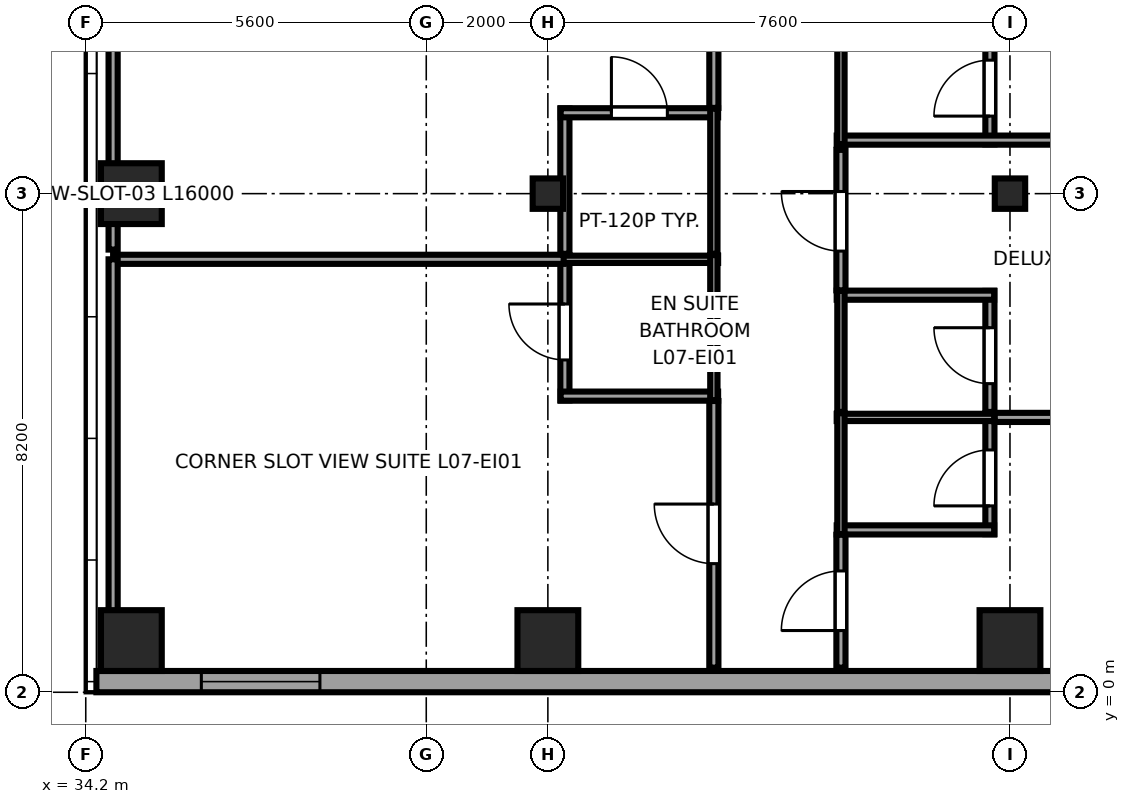
"""IFC4 building model, lengths in metres.
Left out: names, types, materials, properties, quantities, classifications, styles, units other than length and angle.
Written with IfcOpenShell. Run it as: python <this file> out.ifc"""

import sys

from ifc_helpers import new_model, si_unit, direction, frame, frame_2d, origin, origin_2d, place, context, subcontext, project, spatial, rectangle, i_section, extrude, source, transform, mapped, element, fill, save


model = new_model("IFC4")
c1 = context("Model", 3, precision=1e-05, world=origin(), true_north=direction((0.0, 1.0)))
c2 = subcontext(c1, "Body", "Model", "MODEL_VIEW")
j1 = project(units=[si_unit("LENGTHUNIT", "METRE"), si_unit("PLANEANGLEUNIT", "RADIAN")], contexts=[c1])
p1 = place(None, origin())
s1 = spatial("IfcSite", under=j1, at=p1, CompositionType="ELEMENT")
p2 = place(p1, origin())
s2 = spatial("IfcBuilding", under=s1, at=p2, CompositionType="ELEMENT")
p3 = place(p2, frame((0.0, 0.0, 35.55)))
s3 = spatial("IfcBuildingStorey", under=s2, at=p3, CompositionType="ELEMENT", Elevation=35.55)
m1 = source(origin(), c2, "Body", "SweptSolid", [
    extrude(rectangle(XDim=1.0, YDim=1.0, at=origin_2d()), origin(), (0.0, 0.0, 1.0), 3.55),
])
for number, where, z_axis, x_axis in (
    (1, (34.95, 0.85, 0.0), (0.0, 0.0, 1.0), (1.0, 0.0, 0.0)),
    (2, (34.95, 8.2, 0.0), (0.0, 0.0, 1.0), (1.0, 0.0, 0.0)),
    (3, (41.8, 0.85, 0.0), (0.0, 0.0, 1.0), (1.0, 0.0, 0.0)),
):
    element("IfcColumn", number, at=place(p3, frame(where, z_axis=z_axis, x_axis=x_axis)), inside=s3, PredefinedType="COLUMN", context=c2, shape_type="MappedRepresentation", body=[
        mapped(m1, transform((0.0, 0.0, 0.0), x_axis=(1.0, 0.0, 0.0), y_axis=(0.0, 1.0, 0.0), z_axis=(0.0, 0.0, 1.0), scale=1.0)),
    ])
m2 = source(origin(), c2, "Body", "SweptSolid", [
    extrude(i_section(OverallWidth=0.5, OverallDepth=0.5, WebThickness=0.028, FlangeThickness=0.045, at=origin_2d()), origin(), (0.0, 0.0, 1.0), 3.55),
])
p4 = place(p3, frame((41.8, 8.2, 0.0), z_axis=(0.0, 0.0, 1.0), x_axis=(1.0, 0.0, 0.0)))
e4 = element("IfcColumn", 4, at=p4, inside=s3, PredefinedType="COLUMN", context=c2, shape_type="MappedRepresentation", body=[
    mapped(m2, transform((0.0, 0.0, 0.0), x_axis=(1.0, 0.0, 0.0), y_axis=(0.0, 1.0, 0.0), z_axis=(0.0, 0.0, 1.0), scale=1.0)),
])
p5 = place(p3, frame((49.4, 0.85, 0.0), z_axis=(0.0, 0.0, 1.0), x_axis=(1.0, 0.0, 0.0)))
e5 = element("IfcColumn", 5, at=p5, inside=s3, PredefinedType="COLUMN", context=c2, shape_type="MappedRepresentation", body=[
    mapped(m1, transform((0.0, 0.0, 0.0), x_axis=(1.0, 0.0, 0.0), y_axis=(0.0, 1.0, 0.0), z_axis=(0.0, 0.0, 1.0), scale=1.0)),
])
p6 = place(p3, frame((49.4, 8.2, 0.0), z_axis=(0.0, 0.0, 1.0), x_axis=(1.0, 0.0, 0.0)))
e6 = element("IfcColumn", 6, at=p6, inside=s3, PredefinedType="COLUMN", context=c2, shape_type="MappedRepresentation", body=[
    mapped(m2, transform((0.0, 0.0, 0.0), x_axis=(1.0, 0.0, 0.0), y_axis=(0.0, 1.0, 0.0), z_axis=(0.0, 0.0, 1.0), scale=1.0)),
])
p7 = place(p3, frame((34.375, 0.175, 0.0), z_axis=(0.0, 0.0, 1.0), x_axis=(1.0, 0.0, 0.0)))
e7 = element("IfcWall", 7, at=p7, inside=s3, PredefinedType="SOLIDWALL", context=c2, shape_type="SweptSolid", body=[
    extrude(rectangle(XDim=18.008, YDim=0.35, at=frame_2d((9.004, 0.0))), origin(), (0.0, 0.0, 1.0), 3.37),
])
p8 = place(p7, frame((1.726, 0.0, 0.68)))
e8 = element("IfcOpeningElement", 8, at=p8, cuts=e7, PredefinedType="OPENING", context=c2, shape_type="SweptSolid", body=[
    extrude(rectangle(XDim=1.95, YDim=1.82, at=frame_2d((0.975, 0.91))), frame((0.0, 0.185, 0.0), z_axis=(0.0, -1.0, 0.0), x_axis=(1.0, 0.0, 0.0)), (0.0, 0.0, 1.0), 0.37),
])
p9 = place(p7, frame((15.725, 0.0, 0.62)))
e9 = element("IfcOpeningElement", 9, at=p9, cuts=e7, PredefinedType="OPENING", context=c2, shape_type="SweptSolid", body=[
    extrude(rectangle(XDim=1.5, YDim=1.55, at=frame_2d((0.75, 0.775))), frame((0.0, 0.185, 0.0), z_axis=(0.0, -1.0, 0.0), x_axis=(1.0, 0.0, 0.0)), (0.0, 0.0, 1.0), 0.37),
])
p10 = place(p3, frame((42.08, 4.8, 0.0), z_axis=(0.0, 0.0, 1.0), x_axis=(0.0, 1.0, 0.0)))
e10 = element("IfcWall", 10, at=p10, inside=s3, PredefinedType="PARTITIONING", context=c2, shape_type="SweptSolid", body=[
    extrude(rectangle(XDim=2.39, YDim=0.15, at=frame_2d((1.195, 0.0))), origin(), (0.0, 0.0, 1.0), 3.37),
])
p11 = place(p10, frame((0.665, 0.0, 0.0)))
e11 = element("IfcOpeningElement", 11, at=p11, cuts=e10, PredefinedType="OPENING", context=c2, shape_type="SweptSolid", body=[
    extrude(rectangle(XDim=0.92, YDim=2.01, at=frame_2d((0.46, 1.005))), frame((0.0, 0.085, 0.0), z_axis=(0.0, -1.0, 0.0), x_axis=(1.0, 0.0, 0.0)), (0.0, 0.0, 1.0), 0.17),
])
p12 = place(p3, frame((42.01, 4.87, 0.0), z_axis=(0.0, 0.0, 1.0), x_axis=(1.0, 0.0, 0.0)))
e12 = element("IfcWall", 12, at=p12, inside=s3, PredefinedType="PARTITIONING", context=c2, shape_type="SweptSolid", body=[
    extrude(rectangle(XDim=2.59, YDim=0.15, at=frame_2d((1.295, 0.0))), origin(), (0.0, 0.0, 1.0), 3.37),
])
p13 = place(p3, frame((42.01, 7.12, 0.0), z_axis=(0.0, 0.0, 1.0), x_axis=(1.0, 0.0, 0.0)))
e13 = element("IfcWall", 13, at=p13, inside=s3, PredefinedType="PLUMBINGWALL", context=c2, shape_type="SweptSolid", body=[
    extrude(rectangle(XDim=2.59, YDim=0.12, at=frame_2d((1.295, 0.0))), origin(), (0.0, 0.0, 1.0), 3.37),
])
p14 = place(p3, frame((44.53, 4.8, 0.0), z_axis=(0.0, 0.0, 1.0), x_axis=(0.0, 1.0, 0.0)))
e14 = element("IfcWall", 14, at=p14, inside=s3, PredefinedType="PLUMBINGWALL", context=c2, shape_type="SweptSolid", body=[
    extrude(rectangle(XDim=2.39, YDim=0.12, at=frame_2d((1.195, 0.0))), origin(), (0.0, 0.0, 1.0), 3.37),
])
p15 = place(p3, frame((42.08, 7.21, 0.0), z_axis=(0.0, 0.0, 1.0), x_axis=(0.0, 1.0, 0.0)))
e15 = element("IfcWall", 15, at=p15, inside=s3, PredefinedType="PARTITIONING", context=c2, shape_type="SweptSolid", body=[
    extrude(rectangle(XDim=2.39, YDim=0.15, at=frame_2d((1.195, 0.0))), origin(), (0.0, 0.0, 1.0), 3.37),
])
p16 = place(p3, frame((42.01, 9.53, 0.0), z_axis=(0.0, 0.0, 1.0), x_axis=(1.0, 0.0, 0.0)))
e16 = element("IfcWall", 16, at=p16, inside=s3, PredefinedType="PARTITIONING", context=c2, shape_type="SweptSolid", body=[
    extrude(rectangle(XDim=2.59, YDim=0.15, at=frame_2d((1.295, 0.0))), origin(), (0.0, 0.0, 1.0), 3.37),
])
p17 = place(p16, frame((0.835, 0.0, 0.0)))
e17 = element("IfcOpeningElement", 17, at=p17, cuts=e16, PredefinedType="OPENING", context=c2, shape_type="SweptSolid", body=[
    extrude(rectangle(XDim=0.92, YDim=2.01, at=frame_2d((0.46, 1.005))), frame((0.0, 0.085, 0.0), z_axis=(0.0, -1.0, 0.0), x_axis=(1.0, 0.0, 0.0)), (0.0, 0.0, 1.0), 0.17),
])
p18 = place(p3, frame((44.53, 7.21, 0.0), z_axis=(0.0, 0.0, 1.0), x_axis=(0.0, 1.0, 0.0)))
e18 = element("IfcWall", 18, at=p18, inside=s3, PredefinedType="PLUMBINGWALL", context=c2, shape_type="SweptSolid", body=[
    extrude(rectangle(XDim=2.39, YDim=0.12, at=frame_2d((1.195, 0.0))), origin(), (0.0, 0.0, 1.0), 3.37),
])
p19 = place(p3, frame((49.07, 2.6, 0.0), z_axis=(0.0, 0.0, 1.0), x_axis=(0.0, 1.0, 0.0)))
e19 = element("IfcWall", 19, at=p19, inside=s3, PredefinedType="PARTITIONING", context=c2, shape_type="SweptSolid", body=[
    extrude(rectangle(XDim=1.99, YDim=0.15, at=frame_2d((0.995, 0.0))), origin(), (0.0, 0.0, 1.0), 3.37),
])
p20 = place(p19, frame((0.465, 0.0, 0.0)))
e20 = element("IfcOpeningElement", 20, at=p20, cuts=e19, PredefinedType="OPENING", context=c2, shape_type="SweptSolid", body=[
    extrude(rectangle(XDim=0.92, YDim=2.01, at=frame_2d((0.46, 1.005))), frame((0.0, 0.085, 0.0), z_axis=(0.0, -1.0, 0.0), x_axis=(1.0, 0.0, 0.0)), (0.0, 0.0, 1.0), 0.17),
])
p21 = place(p3, frame((46.55, 2.67, 0.0), z_axis=(0.0, 0.0, 1.0), x_axis=(1.0, 0.0, 0.0)))
e21 = element("IfcWall", 21, at=p21, inside=s3, PredefinedType="PARTITIONING", context=c2, shape_type="SweptSolid", body=[
    extrude(rectangle(XDim=2.59, YDim=0.15, at=frame_2d((1.295, 0.0))), origin(), (0.0, 0.0, 1.0), 3.37),
])
p22 = place(p3, frame((46.55, 4.52, 0.0), z_axis=(0.0, 0.0, 1.0), x_axis=(1.0, 0.0, 0.0)))
e22 = element("IfcWall", 22, at=p22, inside=s3, PredefinedType="PLUMBINGWALL", context=c2, shape_type="SweptSolid", body=[
    extrude(rectangle(XDim=2.59, YDim=0.12, at=frame_2d((1.295, 0.0))), origin(), (0.0, 0.0, 1.0), 3.37),
])
p23 = place(p3, frame((46.62, 2.6, 0.0), z_axis=(0.0, 0.0, 1.0), x_axis=(0.0, 1.0, 0.0)))
e23 = element("IfcWall", 23, at=p23, inside=s3, PredefinedType="PLUMBINGWALL", context=c2, shape_type="SweptSolid", body=[
    extrude(rectangle(XDim=1.99, YDim=0.12, at=frame_2d((0.995, 0.0))), origin(), (0.0, 0.0, 1.0), 3.37),
])
p24 = place(p3, frame((49.07, 4.61, 0.0), z_axis=(0.0, 0.0, 1.0), x_axis=(0.0, 1.0, 0.0)))
e24 = element("IfcWall", 24, at=p24, inside=s3, PredefinedType="PARTITIONING", context=c2, shape_type="SweptSolid", body=[
    extrude(rectangle(XDim=1.99, YDim=0.15, at=frame_2d((0.995, 0.0))), origin(), (0.0, 0.0, 1.0), 3.37),
])
p25 = place(p24, frame((0.465, 0.0, 0.0)))
e25 = element("IfcOpeningElement", 25, at=p25, cuts=e24, PredefinedType="OPENING", context=c2, shape_type="SweptSolid", body=[
    extrude(rectangle(XDim=0.92, YDim=2.01, at=frame_2d((0.46, 1.005))), frame((0.0, 0.085, 0.0), z_axis=(0.0, -1.0, 0.0), x_axis=(1.0, 0.0, 0.0)), (0.0, 0.0, 1.0), 0.17),
])
p26 = place(p3, frame((46.55, 6.53, 0.0), z_axis=(0.0, 0.0, 1.0), x_axis=(1.0, 0.0, 0.0)))
e26 = element("IfcWall", 26, at=p26, inside=s3, PredefinedType="PARTITIONING", context=c2, shape_type="SweptSolid", body=[
    extrude(rectangle(XDim=2.59, YDim=0.15, at=frame_2d((1.295, 0.0))), origin(), (0.0, 0.0, 1.0), 3.37),
])
p27 = place(p3, frame((46.62, 4.61, 0.0), z_axis=(0.0, 0.0, 1.0), x_axis=(0.0, 1.0, 0.0)))
e27 = element("IfcWall", 27, at=p27, inside=s3, PredefinedType="PLUMBINGWALL", context=c2, shape_type="SweptSolid", body=[
    extrude(rectangle(XDim=1.99, YDim=0.12, at=frame_2d((0.995, 0.0))), origin(), (0.0, 0.0, 1.0), 3.37),
])
p28 = place(p3, frame((49.07, 9.01, 0.0), z_axis=(0.0, 0.0, 1.0), x_axis=(0.0, 1.0, 0.0)))
e28 = element("IfcWall", 28, at=p28, inside=s3, PredefinedType="PARTITIONING", context=c2, shape_type="SweptSolid", body=[
    extrude(rectangle(XDim=1.99, YDim=0.15, at=frame_2d((0.995, 0.0))), origin(), (0.0, 0.0, 1.0), 3.37),
])
p29 = place(p28, frame((0.465, 0.0, 0.0)))
e29 = element("IfcOpeningElement", 29, at=p29, cuts=e28, PredefinedType="OPENING", context=c2, shape_type="SweptSolid", body=[
    extrude(rectangle(XDim=0.92, YDim=2.01, at=frame_2d((0.46, 1.005))), frame((0.0, 0.085, 0.0), z_axis=(0.0, -1.0, 0.0), x_axis=(1.0, 0.0, 0.0)), (0.0, 0.0, 1.0), 0.17),
])
p30 = place(p3, frame((46.55, 9.08, 0.0), z_axis=(0.0, 0.0, 1.0), x_axis=(1.0, 0.0, 0.0)))
e30 = element("IfcWall", 30, at=p30, inside=s3, PredefinedType="PARTITIONING", context=c2, shape_type="SweptSolid", body=[
    extrude(rectangle(XDim=10.045, YDim=0.15, at=frame_2d((5.022, 0.0))), origin(), (0.0, 0.0, 1.0), 3.37),
])
p31 = place(p3, frame((46.62, 9.01, 0.0), z_axis=(0.0, 0.0, 1.0), x_axis=(0.0, 1.0, 0.0)))
e31 = element("IfcWall", 31, at=p31, inside=s3, PredefinedType="PLUMBINGWALL", context=c2, shape_type="SweptSolid", body=[
    extrude(rectangle(XDim=1.99, YDim=0.12, at=frame_2d((0.995, 0.0))), origin(), (0.0, 0.0, 1.0), 3.37),
])
p32 = place(p3, frame((44.53, 0.405, 0.0), z_axis=(0.0, 0.0, 1.0), x_axis=(0.0, 1.0, 0.0)))
e32 = element("IfcWall", 32, at=p32, inside=s3, PredefinedType="PARTITIONING", context=c2, shape_type="SweptSolid", body=[
    extrude(rectangle(XDim=4.385, YDim=0.15, at=frame_2d((2.192, 0.0))), origin(), (0.0, 0.0, 1.0), 3.37),
])
p33 = place(p32, frame((1.71, 0.0, 0.0)))
e33 = element("IfcOpeningElement", 33, at=p33, cuts=e32, PredefinedType="OPENING", context=c2, shape_type="SweptSolid", body=[
    extrude(rectangle(XDim=0.98, YDim=2.12, at=frame_2d((0.49, 1.06))), frame((0.0, 0.085, 0.0), z_axis=(0.0, -1.0, 0.0), x_axis=(1.0, 0.0, 0.0)), (0.0, 0.0, 1.0), 0.17),
])
p34 = place(p3, frame((34.65, 7.12, 0.0), z_axis=(0.0, 0.0, 1.0), x_axis=(1.0, 0.0, 0.0)))
e34 = element("IfcWall", 34, at=p34, inside=s3, PredefinedType="PARTITIONING", context=c2, shape_type="SweptSolid", body=[
    extrude(rectangle(XDim=7.41, YDim=0.15, at=frame_2d((3.705, 0.0))), origin(), (0.0, 0.0, 1.0), 3.37),
])
p35 = place(p3, frame((34.65, 0.405, 0.0), z_axis=(0.0, 0.0, 1.0), x_axis=(0.0, 1.0, 0.0)))
e35 = element("IfcWall", 35, at=p35, inside=s3, PredefinedType="PARTITIONING", context=c2, shape_type="SweptSolid", body=[
    extrude(rectangle(XDim=6.715, YDim=0.15, at=frame_2d((3.357, 0.0))), origin(), (0.0, 0.0, 1.0), 3.37),
])
p36 = place(p3, frame((44.53, 9.61, 0.0), z_axis=(0.0, 0.0, 1.0), x_axis=(0.0, 1.0, 0.0)))
e36 = element("IfcWall", 36, at=p36, inside=s3, PredefinedType="PARTITIONING", context=c2, shape_type="SweptSolid", body=[
    extrude(rectangle(XDim=4.51, YDim=0.15, at=frame_2d((2.255, 0.0))), origin(), (0.0, 0.0, 1.0), 3.37),
])
p37 = place(p36, frame((1.745, 0.0, 0.0)))
e37 = element("IfcOpeningElement", 37, at=p37, cuts=e36, PredefinedType="OPENING", context=c2, shape_type="SweptSolid", body=[
    extrude(rectangle(XDim=0.98, YDim=2.12, at=frame_2d((0.49, 1.06))), frame((0.0, 0.085, 0.0), z_axis=(0.0, -1.0, 0.0), x_axis=(1.0, 0.0, 0.0)), (0.0, 0.0, 1.0), 0.17),
])
p38 = place(p3, frame((34.65, 7.28, 0.0), z_axis=(0.0, 0.0, 1.0), x_axis=(0.0, 1.0, 0.0)))
e38 = element("IfcWall", 38, at=p38, inside=s3, PredefinedType="PARTITIONING", context=c2, shape_type="SweptSolid", body=[
    extrude(rectangle(XDim=6.84, YDim=0.15, at=frame_2d((3.42, 0.0))), origin(), (0.0, 0.0, 1.0), 3.37),
])
p39 = place(p3, frame((46.62, 0.405, 0.0), z_axis=(0.0, 0.0, 1.0), x_axis=(0.0, 1.0, 0.0)))
e39 = element("IfcWall", 39, at=p39, inside=s3, PredefinedType="PARTITIONING", context=c2, shape_type="SweptSolid", body=[
    extrude(rectangle(XDim=2.185, YDim=0.15, at=frame_2d((1.093, 0.0))), origin(), (0.0, 0.0, 1.0), 3.37),
])
p40 = place(p39, frame((0.61, 0.0, 0.0)))
e40 = element("IfcOpeningElement", 40, at=p40, cuts=e39, PredefinedType="OPENING", context=c2, shape_type="SweptSolid", body=[
    extrude(rectangle(XDim=0.98, YDim=2.12, at=frame_2d((0.49, 1.06))), frame((0.0, 0.085, 0.0), z_axis=(0.0, -1.0, 0.0), x_axis=(1.0, 0.0, 0.0)), (0.0, 0.0, 1.0), 0.17),
])
p41 = place(p3, frame((49.15, 4.52, 0.0), z_axis=(0.0, 0.0, 1.0), x_axis=(1.0, 0.0, 0.0)))
e41 = element("IfcWall", 41, at=p41, inside=s3, PredefinedType="PARTITIONING", context=c2, shape_type="SweptSolid", body=[
    extrude(rectangle(XDim=7.445, YDim=0.15, at=frame_2d((3.723, 0.0))), origin(), (0.0, 0.0, 1.0), 3.37),
])
p42 = place(p3, frame((46.62, 6.61, 0.0), z_axis=(0.0, 0.0, 1.0), x_axis=(0.0, 1.0, 0.0)))
e42 = element("IfcWall", 42, at=p42, inside=s3, PredefinedType="PARTITIONING", context=c2, shape_type="SweptSolid", body=[
    extrude(rectangle(XDim=2.31, YDim=0.15, at=frame_2d((1.155, 0.0))), origin(), (0.0, 0.0, 1.0), 3.37),
])
p43 = place(p42, frame((0.645, 0.0, 0.0)))
e43 = element("IfcOpeningElement", 43, at=p43, cuts=e42, PredefinedType="OPENING", context=c2, shape_type="SweptSolid", body=[
    extrude(rectangle(XDim=0.98, YDim=2.12, at=frame_2d((0.49, 1.06))), frame((0.0, 0.085, 0.0), z_axis=(0.0, -1.0, 0.0), x_axis=(1.0, 0.0, 0.0)), (0.0, 0.0, 1.0), 0.17),
])
m3 = source(origin(), c2, "Body", "SweptSolid", [
    extrude(rectangle(XDim=1.95, YDim=1.82, at=frame_2d((0.975, 0.91))), frame((0.0, 0.09, 0.0), z_axis=(0.0, -1.0, 0.0), x_axis=(1.0, 0.0, 0.0)), (0.0, 0.0, 1.0), 0.06),
])
p44 = place(p8, origin())
e44 = element("IfcWindow", 44, at=p44, inside=s3, PartitioningType="DOUBLE_PANEL_VERTICAL", PredefinedType="WINDOW", context=c2, shape_type="MappedRepresentation", body=[
    mapped(m3, transform((0.0, 0.0, 0.0), x_axis=(1.0, 0.0, 0.0), y_axis=(0.0, 1.0, 0.0), z_axis=(0.0, 0.0, 1.0), scale=1.0)),
])
fill(e8, e44)
m4 = source(origin(), c2, "Body", "SweptSolid", [
    extrude(rectangle(XDim=0.92, YDim=2.01, at=frame_2d((0.46, 1.005))), frame((0.0, 0.025, 0.0), z_axis=(0.0, -1.0, 0.0), x_axis=(1.0, 0.0, 0.0)), (0.0, 0.0, 1.0), 0.05),
])
p45 = place(p11, origin())
e45 = element("IfcDoor", 45, at=p45, inside=s3, OperationType="SINGLE_SWING_RIGHT", PredefinedType="DOOR", context=c2, shape_type="MappedRepresentation", body=[
    mapped(m4, transform((0.0, 0.0, 0.0), x_axis=(1.0, 0.0, 0.0), y_axis=(0.0, 1.0, 0.0), z_axis=(0.0, 0.0, 1.0), scale=1.0)),
])
fill(e11, e45)
p46 = place(p17, origin())
e46 = element("IfcDoor", 46, at=p46, inside=s3, OperationType="SINGLE_SWING_LEFT", PredefinedType="DOOR", context=c2, shape_type="MappedRepresentation", body=[
    mapped(m4, transform((0.0, 0.0, 0.0), x_axis=(1.0, 0.0, 0.0), y_axis=(0.0, 1.0, 0.0), z_axis=(0.0, 0.0, 1.0), scale=1.0)),
])
fill(e17, e46)
p47 = place(p20, origin())
e47 = element("IfcDoor", 47, at=p47, inside=s3, OperationType="SINGLE_SWING_LEFT", PredefinedType="DOOR", context=c2, shape_type="MappedRepresentation", body=[
    mapped(m4, transform((0.0, 0.0, 0.0), x_axis=(1.0, 0.0, 0.0), y_axis=(0.0, 1.0, 0.0), z_axis=(0.0, 0.0, 1.0), scale=1.0)),
])
fill(e20, e47)
p48 = place(p25, origin())
e48 = element("IfcDoor", 48, at=p48, inside=s3, OperationType="SINGLE_SWING_RIGHT", PredefinedType="DOOR", context=c2, shape_type="MappedRepresentation", body=[
    mapped(m4, transform((0.0, 0.0, 0.0), x_axis=(1.0, 0.0, 0.0), y_axis=(0.0, 1.0, 0.0), z_axis=(0.0, 0.0, 1.0), scale=1.0)),
])
fill(e25, e48)
p49 = place(p29, origin())
e49 = element("IfcDoor", 49, at=p49, inside=s3, OperationType="SINGLE_SWING_LEFT", PredefinedType="DOOR", context=c2, shape_type="MappedRepresentation", body=[
    mapped(m4, transform((0.0, 0.0, 0.0), x_axis=(1.0, 0.0, 0.0), y_axis=(0.0, 1.0, 0.0), z_axis=(0.0, 0.0, 1.0), scale=1.0)),
])
fill(e29, e49)
m5 = source(origin(), c2, "Body", "SweptSolid", [
    extrude(rectangle(XDim=0.98, YDim=2.12, at=frame_2d((0.49, 1.06))), frame((0.0, 0.025, 0.0), z_axis=(0.0, -1.0, 0.0), x_axis=(1.0, 0.0, 0.0)), (0.0, 0.0, 1.0), 0.05),
])
p50 = place(p33, origin())
e50 = element("IfcDoor", 50, at=p50, inside=s3, OperationType="SINGLE_SWING_RIGHT", PredefinedType="DOOR", context=c2, shape_type="MappedRepresentation", body=[
    mapped(m5, transform((0.0, 0.0, 0.0), x_axis=(1.0, 0.0, 0.0), y_axis=(0.0, 1.0, 0.0), z_axis=(0.0, 0.0, 1.0), scale=1.0)),
])
fill(e33, e50)
p51 = place(p40, origin())
e51 = element("IfcDoor", 51, at=p51, inside=s3, OperationType="SINGLE_SWING_LEFT", PredefinedType="DOOR", context=c2, shape_type="MappedRepresentation", body=[
    mapped(m5, transform((0.0, 0.0, 0.0), x_axis=(1.0, 0.0, 0.0), y_axis=(0.0, 1.0, 0.0), z_axis=(0.0, 0.0, 1.0), scale=1.0)),
])
fill(e40, e51)
p52 = place(p43, origin())
e52 = element("IfcDoor", 52, at=p52, inside=s3, OperationType="SINGLE_SWING_RIGHT", PredefinedType="DOOR", context=c2, shape_type="MappedRepresentation", body=[
    mapped(m5, transform((0.0, 0.0, 0.0), x_axis=(1.0, 0.0, 0.0), y_axis=(0.0, 1.0, 0.0), z_axis=(0.0, 0.0, 1.0), scale=1.0)),
])
fill(e43, e52)
save(model, sys.argv[1])
